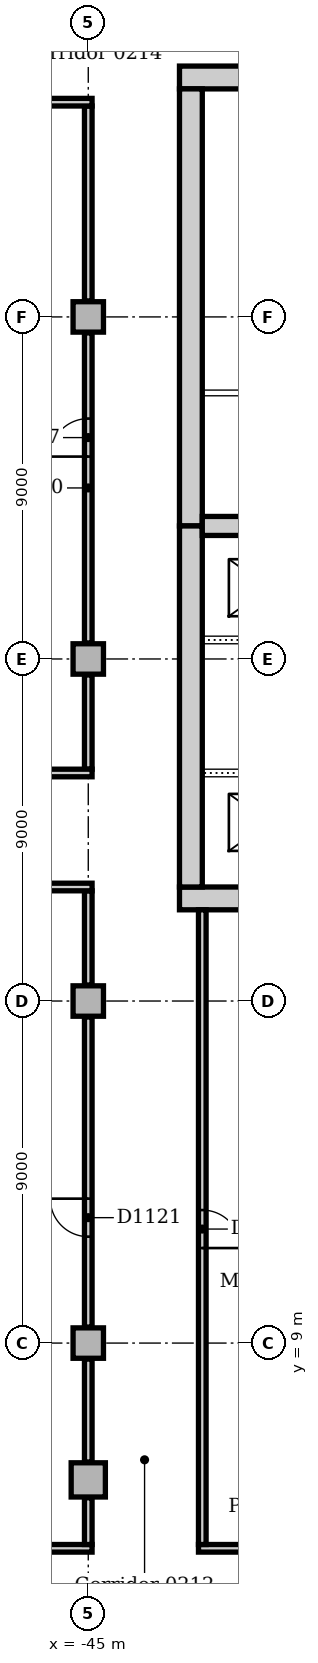
"""IFC4 building model, lengths in metres.
Left out: names, types, materials, properties, quantities, classifications, styles, units other than length and angle.
Written with IfcOpenShell. Run it as: python <this file> out.ifc"""

import sys

from ifc_helpers import new_model, si_unit, direction, frame, frame_2d, origin, origin_2d, place, context, subcontext, project, spatial, rectangle, extrude, element, fill, save


model = new_model("IFC4")
c1 = context("Model", 3, precision=1e-05, world=origin(), true_north=direction((0.0, 1.0)))
c2 = subcontext(c1, "Body", "Model", "MODEL_VIEW")
j1 = project(units=[si_unit("LENGTHUNIT", "METRE"), si_unit("PLANEANGLEUNIT", "RADIAN")], contexts=[c1])
p1 = place(None, origin())
s1 = spatial("IfcSite", under=j1, at=p1, CompositionType="ELEMENT")
p2 = place(p1, origin())
s2 = spatial("IfcBuilding", under=s1, at=p2, CompositionType="ELEMENT")
p3 = place(p2, frame((0.0, 0.0, 11.0)))
s3 = spatial("IfcBuildingStorey", under=s2, at=p3, CompositionType="ELEMENT", Elevation=11.0)
for number, where, z_axis, x_axis in (
    (1, (-42.6, 20.7, 0.0), (0.0, 0.0, 1.0), (1.0, 0.0, 0.0)),
    (2, (-30.9, 42.3, 0.0), (0.0, 0.0, 1.0), (-1.0, 0.0, 0.0)),
):
    element("IfcWall", number, at=place(p3, frame(where, z_axis=z_axis, x_axis=x_axis)), inside=s3, PredefinedType="SOLIDWALL", context=c2, shape_type="SweptSolid", body=[
        extrude(rectangle(XDim=11.7, YDim=0.6, at=frame_2d((5.85, 0.0))), origin(), (0.0, 0.0, 1.0), 5.0),
    ])
p4 = place(p3, frame((-42.3, 42.0, 0.0), z_axis=(0.0, 0.0, 1.0), x_axis=(0.0, -1.0, 0.0)))
e3 = element("IfcWall", 3, at=p4, inside=s3, PredefinedType="SOLIDWALL", context=c2, shape_type="SweptSolid", body=[
    extrude(rectangle(XDim=11.5, YDim=0.6, at=frame_2d((5.75, 0.0))), origin(), (0.0, 0.0, 1.0), 5.0),
])
p5 = place(p4, frame((8.85, 0.0, 0.0)))
e4 = element("IfcOpeningElement", 4, at=p5, cuts=e3, PredefinedType="OPENING", context=c2, shape_type="SweptSolid", body=[
    extrude(rectangle(XDim=1.8, YDim=2.1, at=frame_2d((0.9, 1.05))), frame((0.0, 0.31, 0.0), z_axis=(0.0, -1.0, 0.0), x_axis=(1.0, 0.0, 0.0)), (0.0, 0.0, 1.0), 0.62),
])
p6 = place(p3, frame((-42.3, 30.5, 0.0), z_axis=(0.0, 0.0, 1.0), x_axis=(0.0, -1.0, 0.0)))
e5 = element("IfcWall", 5, at=p6, inside=s3, PredefinedType="SOLIDWALL", context=c2, shape_type="SweptSolid", body=[
    extrude(rectangle(XDim=9.5, YDim=0.6, at=frame_2d((4.75, 0.0))), origin(), (0.0, 0.0, 1.0), 5.0),
])
p7 = place(p6, frame((3.85, 0.0, 0.0)))
e6 = element("IfcOpeningElement", 6, at=p7, cuts=e5, PredefinedType="OPENING", context=c2, shape_type="SweptSolid", body=[
    extrude(rectangle(XDim=1.8, YDim=2.1, at=frame_2d((0.9, 1.05))), frame((0.0, 0.31, 0.0), z_axis=(0.0, -1.0, 0.0), x_axis=(1.0, 0.0, 0.0)), (0.0, 0.0, 1.0), 0.62),
])
p8 = place(p3, frame((-42.0, 30.5, 0.0), z_axis=(0.0, 0.0, 1.0), x_axis=(1.0, 0.0, 0.0)))
e7 = element("IfcWall", 7, at=p8, inside=s3, PredefinedType="SOLIDWALL", context=c2, shape_type="SweptSolid", body=[
    extrude(rectangle(XDim=10.5, YDim=0.5, at=frame_2d((5.25, 0.0))), origin(), (0.0, 0.0, 1.0), 5.0),
])
p9 = place(p3, frame((-45.0, 5.4, 0.0), z_axis=(0.0, 0.0, 1.0), x_axis=(1.0, 0.0, 0.0)))
e8 = element("IfcColumn", 8, at=p9, inside=s3, PredefinedType="COLUMN", context=c2, shape_type="SweptSolid", body=[
    extrude(rectangle(XDim=0.9, YDim=0.9, at=origin_2d()), origin(), (0.0, 0.0, 1.0), 4.7),
])
for number, where, z_axis, x_axis in (
    (9, (-45.0, 9.0, 0.0), (0.0, 0.0, 1.0), (1.0, 0.0, 0.0)),
    (10, (-45.0, 18.0, 0.0), (0.0, 0.0, 1.0), (1.0, 0.0, 0.0)),
    (11, (-45.0, 27.0, 0.0), (0.0, 0.0, 1.0), (1.0, 0.0, 0.0)),
    (12, (-45.0, 36.0, 0.0), (0.0, 0.0, 1.0), (1.0, 0.0, 0.0)),
):
    element("IfcColumn", number, at=place(p3, frame(where, z_axis=z_axis, x_axis=x_axis)), inside=s3, PredefinedType="COLUMN", context=c2, shape_type="SweptSolid", body=[
        extrude(rectangle(XDim=0.8, YDim=0.8, at=origin_2d()), origin(), (0.0, 0.0, 1.0), 4.7),
    ])
p10 = place(p3, frame((-54.0, 3.6, 0.0), z_axis=(0.0, 0.0, 1.0), x_axis=(1.0, 0.0, 0.0)))
e13 = element("IfcWall", 13, at=p10, inside=s3, PredefinedType="PARTITIONING", context=c2, shape_type="SweptSolid", body=[
    extrude(rectangle(XDim=9.1, YDim=0.2, at=frame_2d((4.55, 0.0))), origin(), (0.0, 0.0, 1.0), 4.7),
])
p11 = place(p3, frame((-42.1, 3.6, 0.0), z_axis=(0.0, 0.0, 1.0), x_axis=(1.0, 0.0, 0.0)))
e14 = element("IfcWall", 14, at=p11, inside=s3, PredefinedType="PARTITIONING", context=c2, shape_type="SweptSolid", body=[
    extrude(rectangle(XDim=6.1, YDim=0.2, at=frame_2d((3.05, 0.0))), origin(), (0.0, 0.0, 1.0), 4.7),
])
p12 = place(p3, frame((-45.0, 3.7, 0.0), z_axis=(0.0, 0.0, 1.0), x_axis=(0.0, 1.0, 0.0)))
e15 = element("IfcWall", 15, at=p12, inside=s3, PredefinedType="PARTITIONING", context=c2, shape_type="SweptSolid", body=[
    extrude(rectangle(XDim=1.23, YDim=0.2, at=frame_2d((0.615, 0.0))), origin(), (0.0, 0.0, 1.0), 4.7),
])
p13 = place(p3, frame((-45.0, 5.87, 0.0), z_axis=(0.0, 0.0, 1.0), x_axis=(0.0, 1.0, 0.0)))
e16 = element("IfcWall", 16, at=p13, inside=s3, PredefinedType="PARTITIONING", context=c2, shape_type="SweptSolid", body=[
    extrude(rectangle(XDim=2.71, YDim=0.2, at=frame_2d((1.355, 0.0))), origin(), (0.0, 0.0, 1.0), 4.7),
])
p14 = place(p3, frame((-45.0, 9.42, 0.0), z_axis=(0.0, 0.0, 1.0), x_axis=(0.0, 1.0, 0.0)))
e17 = element("IfcWall", 17, at=p14, inside=s3, PredefinedType="PARTITIONING", context=c2, shape_type="SweptSolid", body=[
    extrude(rectangle(XDim=8.16, YDim=0.2, at=frame_2d((4.08, 0.0))), origin(), (0.0, 0.0, 1.0), 4.7),
])
p15 = place(p14, frame((2.38, 0.0, 0.0)))
e18 = element("IfcOpeningElement", 18, at=p15, cuts=e17, PredefinedType="OPENING", context=c2, shape_type="SweptSolid", body=[
    extrude(rectangle(XDim=1.0, YDim=2.1, at=frame_2d((0.5, 1.05))), frame((0.0, 0.11, 0.0), z_axis=(0.0, -1.0, 0.0), x_axis=(1.0, 0.0, 0.0)), (0.0, 0.0, 1.0), 0.22),
])
p16 = place(p3, frame((-45.0, 18.42, 0.0), z_axis=(0.0, 0.0, 1.0), x_axis=(0.0, 1.0, 0.0)))
e19 = element("IfcWall", 19, at=p16, inside=s3, PredefinedType="PARTITIONING", context=c2, shape_type="SweptSolid", body=[
    extrude(rectangle(XDim=2.48, YDim=0.2, at=frame_2d((1.24, 0.0))), origin(), (0.0, 0.0, 1.0), 4.7),
])
p17 = place(p3, frame((-42.0, 3.7, 0.0), z_axis=(0.0, 0.0, 1.0), x_axis=(0.0, 1.0, 0.0)))
e20 = element("IfcWall", 20, at=p17, inside=s3, PredefinedType="PARTITIONING", context=c2, shape_type="SweptSolid", body=[
    extrude(rectangle(XDim=16.7, YDim=0.2, at=frame_2d((8.35, 0.0))), origin(), (0.0, 0.0, 1.0), 4.7),
])
p18 = place(p17, frame((7.8, 0.0, 0.0)))
e21 = element("IfcOpeningElement", 21, at=p18, cuts=e20, PredefinedType="OPENING", context=c2, shape_type="SweptSolid", body=[
    extrude(rectangle(XDim=1.0, YDim=2.1, at=frame_2d((0.5, 1.05))), frame((0.0, 0.11, 0.0), z_axis=(0.0, -1.0, 0.0), x_axis=(1.0, 0.0, 0.0)), (0.0, 0.0, 1.0), 0.22),
])
p19 = place(p3, frame((-45.0, 24.1, 0.0), z_axis=(0.0, 0.0, 1.0), x_axis=(0.0, 1.0, 0.0)))
e22 = element("IfcWall", 22, at=p19, inside=s3, PredefinedType="PARTITIONING", context=c2, shape_type="SweptSolid", body=[
    extrude(rectangle(XDim=2.48, YDim=0.2, at=frame_2d((1.24, 0.0))), origin(), (0.0, 0.0, 1.0), 4.7),
])
p20 = place(p3, frame((-45.0, 27.42, 0.0), z_axis=(0.0, 0.0, 1.0), x_axis=(0.0, 1.0, 0.0)))
e23 = element("IfcWall", 23, at=p20, inside=s3, PredefinedType="PARTITIONING", context=c2, shape_type="SweptSolid", body=[
    extrude(rectangle(XDim=8.16, YDim=0.2, at=frame_2d((4.08, 0.0))), origin(), (0.0, 0.0, 1.0), 4.7),
])
p21 = place(p20, frame((4.905, 0.0, 0.0)))
e24 = element("IfcOpeningElement", 24, at=p21, cuts=e23, PredefinedType="OPENING", context=c2, shape_type="SweptSolid", body=[
    extrude(rectangle(XDim=1.0, YDim=2.1, at=frame_2d((0.5, 1.05))), frame((0.0, 0.11, 0.0), z_axis=(0.0, -1.0, 0.0), x_axis=(1.0, 0.0, 0.0)), (0.0, 0.0, 1.0), 0.22),
])
p22 = place(p3, frame((-45.0, 36.42, 0.0), z_axis=(0.0, 0.0, 1.0), x_axis=(0.0, 1.0, 0.0)))
e25 = element("IfcWall", 25, at=p22, inside=s3, PredefinedType="PARTITIONING", context=c2, shape_type="SweptSolid", body=[
    extrude(rectangle(XDim=5.13, YDim=0.2, at=frame_2d((2.565, 0.0))), origin(), (0.0, 0.0, 1.0), 4.7),
])
p23 = place(p3, frame((-54.0, 21.0, 0.0), z_axis=(0.0, 0.0, 1.0), x_axis=(1.0, 0.0, 0.0)))
e26 = element("IfcWall", 26, at=p23, inside=s3, PredefinedType="PARTITIONING", context=c2, shape_type="SweptSolid", body=[
    extrude(rectangle(XDim=9.1, YDim=0.2, at=frame_2d((4.55, 0.0))), origin(), (0.0, 0.0, 1.0), 4.7),
])
for number, where, z_axis, x_axis in (
    (27, (-52.5, 24.0, 0.0), (0.0, 0.0, 1.0), (1.0, 0.0, 0.0)),
    (28, (-52.5, 41.65, 0.0), (0.0, 0.0, 1.0), (1.0, 0.0, 0.0)),
):
    element("IfcWall", number, at=place(p3, frame(where, z_axis=z_axis, x_axis=x_axis)), inside=s3, PredefinedType="PARTITIONING", context=c2, shape_type="SweptSolid", body=[
        extrude(rectangle(XDim=7.6, YDim=0.2, at=frame_2d((3.8, 0.0))), origin(), (0.0, 0.0, 1.0), 4.7),
    ])
p24 = place(p3, frame((-38.6, 24.0, 0.0), z_axis=(0.0, 0.0, 1.0), x_axis=(-1.0, 0.0, 0.0)))
e29 = element("IfcWall", 29, at=p24, inside=s3, PredefinedType="SOLIDWALL", context=c2, shape_type="SweptSolid", body=[
    extrude(rectangle(XDim=3.4, YDim=0.2, at=frame_2d((1.7, 0.0))), origin(), (0.0, 0.0, 1.0), 5.0),
])
p25 = place(p24, frame((0.8, 0.0, 0.0)))
e30 = element("IfcOpeningElement", 30, at=p25, cuts=e29, PredefinedType="OPENING", context=c2, shape_type="SweptSolid", body=[
    extrude(rectangle(XDim=1.1, YDim=2.1, at=frame_2d((0.55, 1.05))), frame((0.0, 0.11, 0.0), z_axis=(0.0, -1.0, 0.0), x_axis=(1.0, 0.0, 0.0)), (0.0, 0.0, 1.0), 0.22),
])
p26 = place(p3, frame((-42.0, 27.5, 0.0), z_axis=(0.0, 0.0, 1.0), x_axis=(1.0, 0.0, 0.0)))
e31 = element("IfcWall", 31, at=p26, inside=s3, PredefinedType="SOLIDWALL", context=c2, shape_type="SweptSolid", body=[
    extrude(rectangle(XDim=3.4, YDim=0.2, at=frame_2d((1.7, 0.0))), origin(), (0.0, 0.0, 1.0), 5.0),
])
p27 = place(p26, frame((1.5, 0.0, 0.0)))
e32 = element("IfcOpeningElement", 32, at=p27, cuts=e31, PredefinedType="OPENING", context=c2, shape_type="SweptSolid", body=[
    extrude(rectangle(XDim=1.1, YDim=2.1, at=frame_2d((0.55, 1.05))), frame((0.0, 0.11, 0.0), z_axis=(0.0, -1.0, 0.0), x_axis=(1.0, 0.0, 0.0)), (0.0, 0.0, 1.0), 0.22),
])
p28 = place(p3, frame((-39.325, 34.0, 0.0), z_axis=(0.0, 0.0, 1.0), x_axis=(-1.0, 0.0, 0.0)))
e33 = element("IfcWall", 33, at=p28, inside=s3, PredefinedType="PARTITIONING", context=c2, shape_type="SweptSolid", body=[
    extrude(rectangle(XDim=2.675, YDim=0.15, at=frame_2d((1.337, 0.0))), origin(), (0.0, 0.0, 1.0), 4.7),
])
p29 = place(p28, frame((0.975, 0.0, 0.0)))
e34 = element("IfcOpeningElement", 34, at=p29, cuts=e33, PredefinedType="OPENING", context=c2, shape_type="SweptSolid", body=[
    extrude(rectangle(XDim=0.8, YDim=2.1, at=frame_2d((0.4, 1.05))), frame((0.0, 0.085, 0.0), z_axis=(0.0, -1.0, 0.0), x_axis=(1.0, 0.0, 0.0)), (0.0, 0.0, 1.0), 0.17),
])
p30 = place(p15, origin())
e35 = element("IfcDoor", 35, at=p30, inside=s3, OperationType="SINGLE_SWING_RIGHT", PredefinedType="DOOR", context=c2, shape_type="SweptSolid", body=[
    extrude(rectangle(XDim=1.0, YDim=2.1, at=frame_2d((0.5, 1.05))), frame((0.0, 0.025, 0.0), z_axis=(0.0, -1.0, 0.0), x_axis=(1.0, 0.0, 0.0)), (0.0, 0.0, 1.0), 0.05),
])
fill(e18, e35)
p31 = place(p18, frame((1.0, 0.0, 0.0), z_axis=(0.0, 0.0, 1.0), x_axis=(-1.0, 0.0, 0.0)))
e36 = element("IfcDoor", 36, at=p31, inside=s3, OperationType="SINGLE_SWING_RIGHT", PredefinedType="DOOR", context=c2, shape_type="SweptSolid", body=[
    extrude(rectangle(XDim=1.0, YDim=2.1, at=frame_2d((0.5, 1.05))), frame((0.0, 0.025, 0.0), z_axis=(0.0, -1.0, 0.0), x_axis=(1.0, 0.0, 0.0)), (0.0, 0.0, 1.0), 0.05),
])
fill(e21, e36)
p32 = place(p21, origin())
e37 = element("IfcDoor", 37, at=p32, inside=s3, OperationType="SINGLE_SWING_LEFT", PredefinedType="DOOR", context=c2, shape_type="SweptSolid", body=[
    extrude(rectangle(XDim=1.0, YDim=2.1, at=frame_2d((0.5, 1.05))), frame((0.0, 0.025, 0.0), z_axis=(0.0, -1.0, 0.0), x_axis=(1.0, 0.0, 0.0)), (0.0, 0.0, 1.0), 0.05),
])
fill(e24, e37)
p33 = place(p7, origin())
e38 = element("IfcDoor", 38, at=p33, inside=s3, OperationType="DOUBLE_DOOR_SINGLE_SWING", PredefinedType="DOOR", context=c2, shape_type="SweptSolid", body=[
    extrude(rectangle(XDim=1.8, YDim=2.1, at=frame_2d((0.9, 1.05))), frame((0.0, 0.025, 0.0), z_axis=(0.0, -1.0, 0.0), x_axis=(1.0, 0.0, 0.0)), (0.0, 0.0, 1.0), 0.05),
])
fill(e6, e38)
p34 = place(p5, frame((1.8, 0.0, 0.0), z_axis=(0.0, 0.0, 1.0), x_axis=(-1.0, 0.0, 0.0)))
e39 = element("IfcDoor", 39, at=p34, inside=s3, OperationType="DOUBLE_DOOR_SINGLE_SWING", PredefinedType="DOOR", context=c2, shape_type="SweptSolid", body=[
    extrude(rectangle(XDim=1.8, YDim=2.1, at=frame_2d((0.9, 1.05))), frame((0.0, 0.025, 0.0), z_axis=(0.0, -1.0, 0.0), x_axis=(1.0, 0.0, 0.0)), (0.0, 0.0, 1.0), 0.05),
])
fill(e4, e39)
p35 = place(p29, frame((0.8, 0.0, 0.0), z_axis=(0.0, 0.0, 1.0), x_axis=(-1.0, 0.0, 0.0)))
e40 = element("IfcDoor", 40, at=p35, inside=s3, OperationType="SINGLE_SWING_LEFT", PredefinedType="DOOR", context=c2, shape_type="SweptSolid", body=[
    extrude(rectangle(XDim=0.8, YDim=2.1, at=frame_2d((0.4, 1.05))), frame((0.0, 0.025, 0.0), z_axis=(0.0, -1.0, 0.0), x_axis=(1.0, 0.0, 0.0)), (0.0, 0.0, 1.0), 0.05),
])
fill(e34, e40)
save(model, sys.argv[1])
